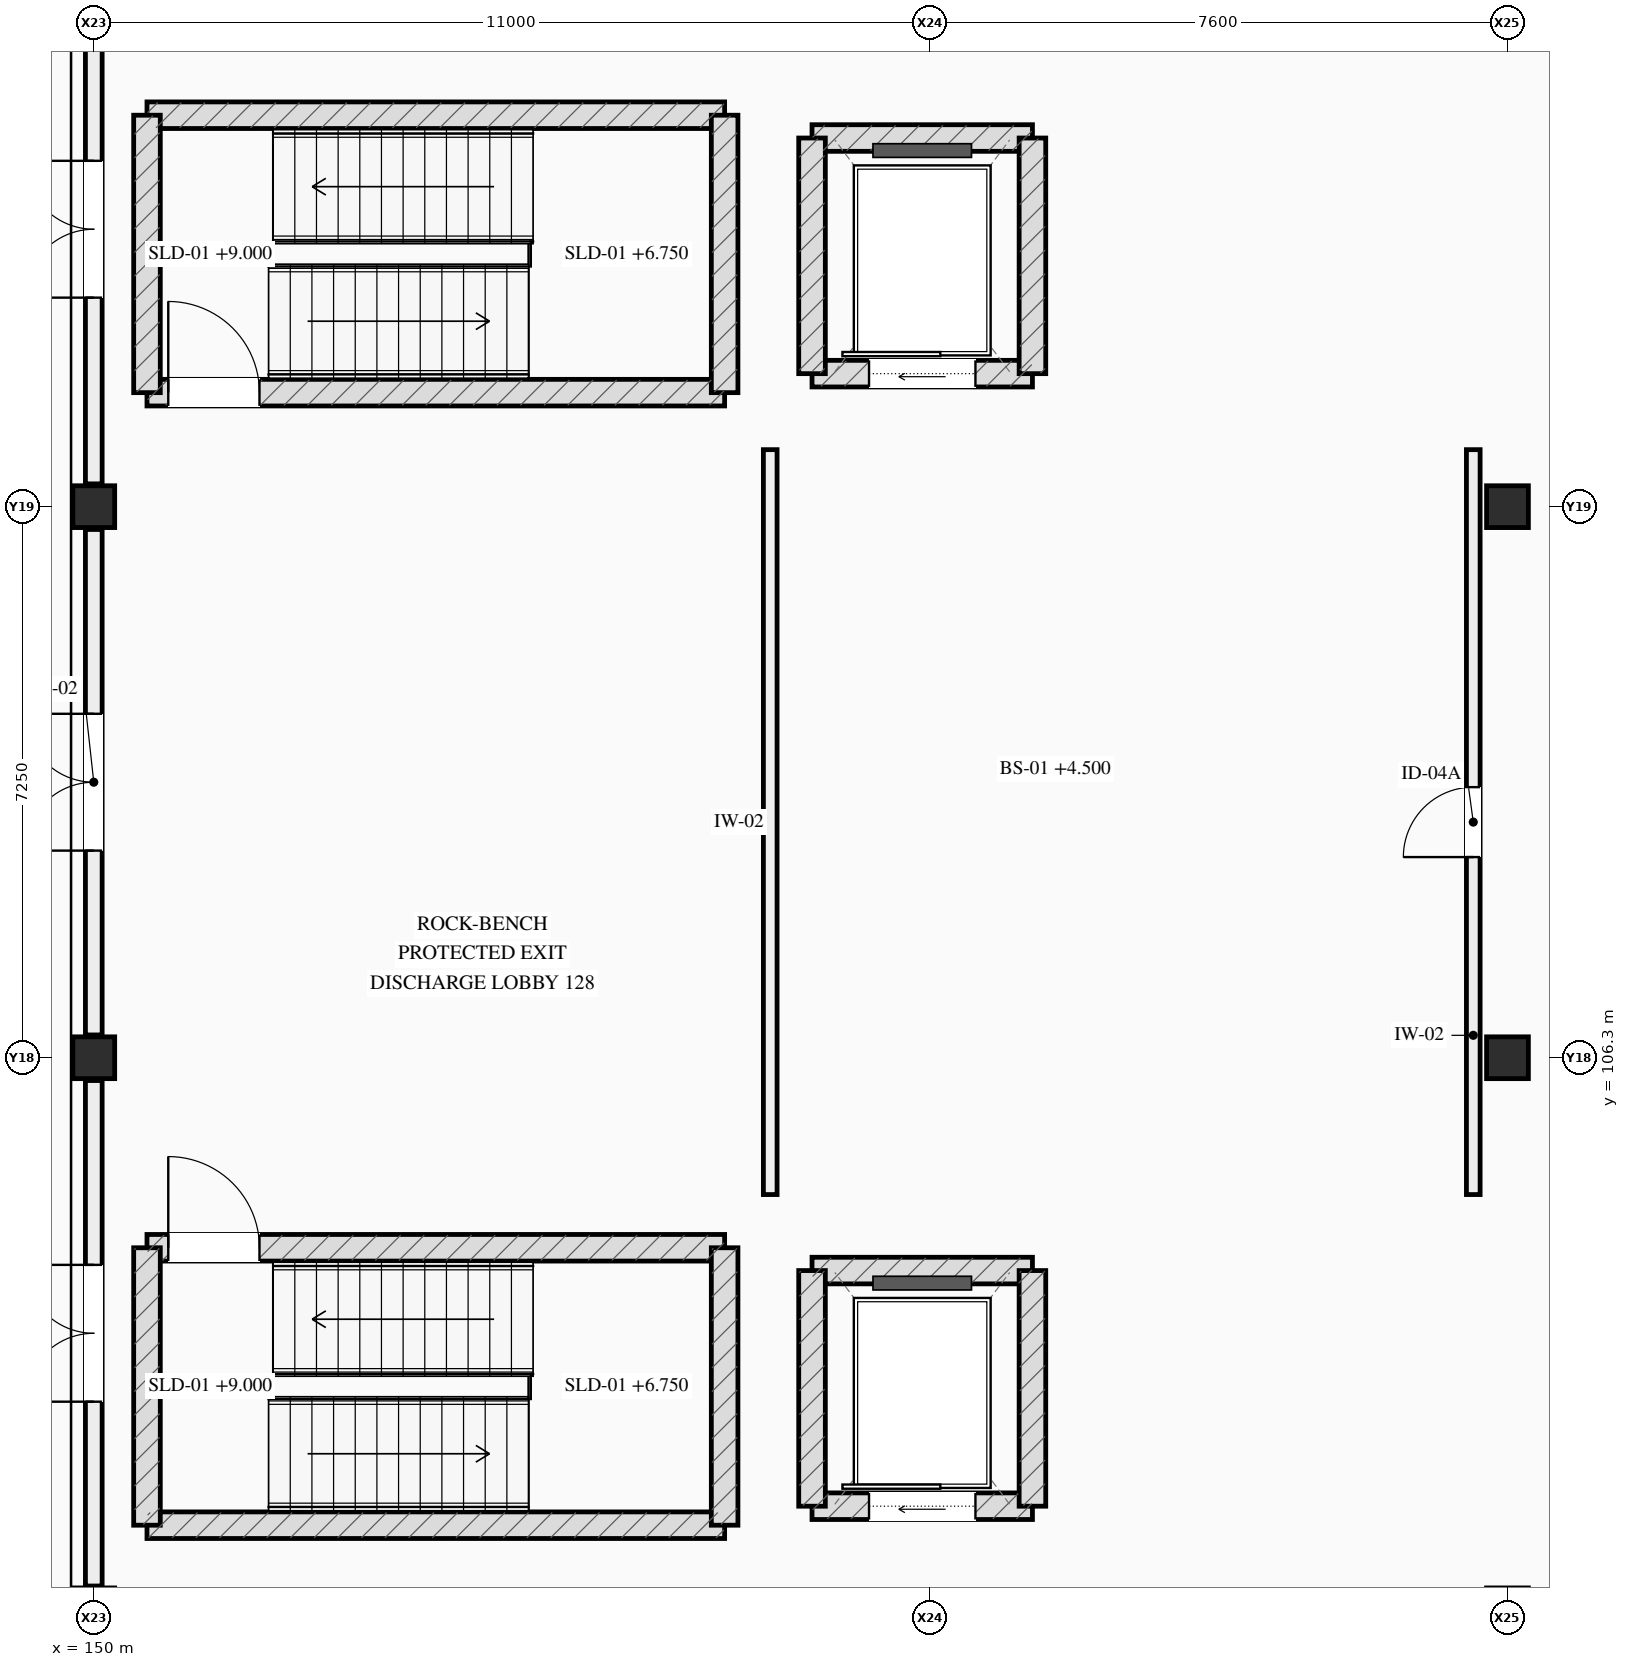
"""IFC4 building model, lengths in metres.
Left out: names, types, materials, properties, quantities, classifications, styles, units other than length and angle.
Written with IfcOpenShell. Run it as: python <this file> out.ifc"""

import sys

from ifc_helpers import new_model, si_unit, direction, frame, frame_2d, origin, origin_2d, place, context, subcontext, project, spatial, rectangle, extrude, element, fill, save


model = new_model("IFC4")
c1 = context("Model", 3, precision=1e-05, world=origin(), true_north=direction((0.0, 1.0)))
c2 = subcontext(c1, "Body", "Model", "MODEL_VIEW")
j1 = project(units=[si_unit("LENGTHUNIT", "METRE"), si_unit("PLANEANGLEUNIT", "RADIAN")], contexts=[c1])
p1 = place(None, origin())
s1 = spatial("IfcSite", under=j1, at=p1, CompositionType="ELEMENT")
p2 = place(p1, origin())
s2 = spatial("IfcBuilding", under=s1, at=p2, CompositionType="ELEMENT")
p3 = place(p2, frame((0.0, 0.0, 4.5)))
s3 = spatial("IfcBuildingStorey", under=s2, at=p3, CompositionType="ELEMENT", Elevation=4.5)
for number, where, z_axis, x_axis in (
    (1, (150.0, 99.05, 0.0), (0.0, 0.0, 1.0), (1.0, 0.0, 0.0)),
    (2, (150.0, 106.3, 0.0), (0.0, 0.0, 1.0), (1.0, 0.0, 0.0)),
    (3, (150.0, 113.55, 0.0), (0.0, 0.0, 1.0), (1.0, 0.0, 0.0)),
    (4, (168.6, 99.05, 0.0), (0.0, 0.0, 1.0), (1.0, 0.0, 0.0)),
    (5, (168.6, 106.3, 0.0), (0.0, 0.0, 1.0), (1.0, 0.0, 0.0)),
    (6, (168.6, 113.55, 0.0), (0.0, 0.0, 1.0), (1.0, 0.0, 0.0)),
):
    element("IfcColumn", number, at=place(p3, frame(where, z_axis=z_axis, x_axis=x_axis)), inside=s3, PredefinedType="COLUMN", context=c2, shape_type="SweptSolid", body=[
        extrude(rectangle(XDim=0.55, YDim=0.55, at=origin_2d()), origin(), (0.0, 0.0, 1.0), 4.5),
    ])
p4 = place(p3, frame((150.0, 99.35, 0.0), z_axis=(0.0, 0.0, 1.0), x_axis=(0.0, 1.0, 0.0)))
e7 = element("IfcWall", 7, at=p4, inside=s3, PredefinedType="STANDARD", context=c2, shape_type="SweptSolid", body=[
    extrude(rectangle(XDim=6.65, YDim=0.22, at=frame_2d((3.325, 0.0))), origin(), (0.0, 0.0, 1.0), 3.545),
])
p5 = place(p4, frame((2.425, 0.0, 0.0)))
e8 = element("IfcOpeningElement", 8, at=p5, cuts=e7, PredefinedType="OPENING", context=c2, shape_type="SweptSolid", body=[
    extrude(rectangle(XDim=1.8, YDim=2.25, at=frame_2d((0.9, 1.125))), frame((0.0, 0.12, 0.0), z_axis=(0.0, -1.0, 0.0), x_axis=(1.0, 0.0, 0.0)), (0.0, 0.0, 1.0), 0.24),
])
p6 = place(p3, frame((150.0, 106.6, 0.0), z_axis=(0.0, 0.0, 1.0), x_axis=(0.0, 1.0, 0.0)))
e9 = element("IfcWall", 9, at=p6, inside=s3, PredefinedType="STANDARD", context=c2, shape_type="SweptSolid", body=[
    extrude(rectangle(XDim=6.65, YDim=0.22, at=frame_2d((3.325, 0.0))), origin(), (0.0, 0.0, 1.0), 3.545),
])
p7 = place(p6, frame((2.425, 0.0, 0.0)))
e10 = element("IfcOpeningElement", 10, at=p7, cuts=e9, PredefinedType="OPENING", context=c2, shape_type="SweptSolid", body=[
    extrude(rectangle(XDim=1.8, YDim=2.25, at=frame_2d((0.9, 1.125))), frame((0.0, 0.12, 0.0), z_axis=(0.0, -1.0, 0.0), x_axis=(1.0, 0.0, 0.0)), (0.0, 0.0, 1.0), 0.24),
])
p8 = place(p3, frame((150.0, 113.85, 0.0), z_axis=(0.0, 0.0, 1.0), x_axis=(0.0, 1.0, 0.0)))
e11 = element("IfcWall", 11, at=p8, inside=s3, PredefinedType="STANDARD", context=c2, shape_type="SweptSolid", body=[
    extrude(rectangle(XDim=6.7, YDim=0.22, at=frame_2d((3.35, 0.0))), origin(), (0.0, 0.0, 1.0), 3.545),
])
p9 = place(p8, frame((2.45, 0.0, 0.0)))
e12 = element("IfcOpeningElement", 12, at=p9, cuts=e11, PredefinedType="OPENING", context=c2, shape_type="SweptSolid", body=[
    extrude(rectangle(XDim=1.8, YDim=2.25, at=frame_2d((0.9, 1.125))), frame((0.0, 0.12, 0.0), z_axis=(0.0, -1.0, 0.0), x_axis=(1.0, 0.0, 0.0)), (0.0, 0.0, 1.0), 0.24),
])
p10 = place(p3, frame((158.3, 100.15, 0.0), z_axis=(0.0, 0.0, 1.0), x_axis=(-1.0, 0.0, 0.0)))
e13 = element("IfcWall", 13, at=p10, inside=s3, PredefinedType="SHEAR", context=c2, shape_type="SweptSolid", body=[
    extrude(rectangle(XDim=7.6, YDim=0.35, at=frame_2d((3.8, 0.0))), origin(), (0.0, 0.0, 1.0), 4.215),
])
p11 = place(p3, frame((150.7, 103.8, 0.0), z_axis=(0.0, 0.0, 1.0), x_axis=(1.0, 0.0, 0.0)))
e14 = element("IfcWall", 14, at=p11, inside=s3, PredefinedType="SHEAR", context=c2, shape_type="SweptSolid", body=[
    extrude(rectangle(XDim=7.6, YDim=0.35, at=frame_2d((3.8, 0.0))), origin(), (0.0, 0.0, 1.0), 4.215),
])
p12 = place(p11, frame((0.28, 0.0, 0.0)))
e15 = element("IfcOpeningElement", 15, at=p12, cuts=e14, PredefinedType="OPENING", context=c2, shape_type="SweptSolid", body=[
    extrude(rectangle(XDim=1.2, YDim=2.2, at=frame_2d((0.6, 1.1))), frame((0.0, 0.185, 0.0), z_axis=(0.0, -1.0, 0.0), x_axis=(1.0, 0.0, 0.0)), (0.0, 0.0, 1.0), 0.37),
])
for number, where, z_axis, x_axis in (
    (16, (150.7, 100.15, 0.0), (0.0, 0.0, 1.0), (0.0, 1.0, 0.0)),
    (17, (158.3, 103.8, 0.0), (0.0, 0.0, 1.0), (0.0, -1.0, 0.0)),
):
    element("IfcWall", number, at=place(p3, frame(where, z_axis=z_axis, x_axis=x_axis)), inside=s3, PredefinedType="SHEAR", context=c2, shape_type="SweptSolid", body=[
        extrude(rectangle(XDim=3.65, YDim=0.35, at=frame_2d((1.825, 0.0))), origin(), (0.0, 0.0, 1.0), 4.215),
    ])
p13 = place(p3, frame((159.45, 100.4, 0.0), z_axis=(0.0, 0.0, 1.0), x_axis=(1.0, 0.0, 0.0)))
e18 = element("IfcWall", 18, at=p13, inside=s3, PredefinedType="SHEAR", context=c2, shape_type="SweptSolid", body=[
    extrude(rectangle(XDim=2.9, YDim=0.35, at=frame_2d((1.45, 0.0))), origin(), (0.0, 0.0, 1.0), 4.215),
])
p14 = place(p13, frame((0.75, 0.0, 0.0)))
e19 = element("IfcOpeningElement", 19, at=p14, cuts=e18, PredefinedType="OPENING", context=c2, shape_type="SweptSolid", body=[
    extrude(rectangle(XDim=1.4, YDim=2.2, at=frame_2d((0.7, 1.1))), frame((0.0, 0.185, 0.0), z_axis=(0.0, -1.0, 0.0), x_axis=(1.0, 0.0, 0.0)), (0.0, 0.0, 1.0), 0.37),
])
p15 = place(p3, frame((159.45, 103.5, 0.0), z_axis=(0.0, 0.0, 1.0), x_axis=(1.0, 0.0, 0.0)))
e20 = element("IfcWall", 20, at=p15, inside=s3, PredefinedType="SHEAR", context=c2, shape_type="SweptSolid", body=[
    extrude(rectangle(XDim=2.9, YDim=0.35, at=frame_2d((1.45, 0.0))), origin(), (0.0, 0.0, 1.0), 4.215),
])
for number, where, z_axis, x_axis in (
    (21, (159.45, 100.4, 0.0), (0.0, 0.0, 1.0), (0.0, 1.0, 0.0)),
    (22, (162.35, 100.4, 0.0), (0.0, 0.0, 1.0), (0.0, 1.0, 0.0)),
):
    element("IfcWall", number, at=place(p3, frame(where, z_axis=z_axis, x_axis=x_axis)), inside=s3, PredefinedType="SHEAR", context=c2, shape_type="SweptSolid", body=[
        extrude(rectangle(XDim=3.1, YDim=0.35, at=frame_2d((1.55, 0.0))), origin(), (0.0, 0.0, 1.0), 4.215),
    ])
p16 = place(p3, frame((158.3, 115.05, 0.0), z_axis=(0.0, 0.0, 1.0), x_axis=(-1.0, 0.0, 0.0)))
e23 = element("IfcWall", 23, at=p16, inside=s3, PredefinedType="SHEAR", context=c2, shape_type="SweptSolid", body=[
    extrude(rectangle(XDim=7.6, YDim=0.35, at=frame_2d((3.8, 0.0))), origin(), (0.0, 0.0, 1.0), 4.215),
])
p17 = place(p16, frame((6.12, 0.0, 0.0)))
e24 = element("IfcOpeningElement", 24, at=p17, cuts=e23, PredefinedType="OPENING", context=c2, shape_type="SweptSolid", body=[
    extrude(rectangle(XDim=1.2, YDim=2.2, at=frame_2d((0.6, 1.1))), frame((0.0, 0.185, 0.0), z_axis=(0.0, -1.0, 0.0), x_axis=(1.0, 0.0, 0.0)), (0.0, 0.0, 1.0), 0.37),
])
p18 = place(p3, frame((150.7, 118.7, 0.0), z_axis=(0.0, 0.0, 1.0), x_axis=(1.0, 0.0, 0.0)))
e25 = element("IfcWall", 25, at=p18, inside=s3, PredefinedType="SHEAR", context=c2, shape_type="SweptSolid", body=[
    extrude(rectangle(XDim=7.6, YDim=0.35, at=frame_2d((3.8, 0.0))), origin(), (0.0, 0.0, 1.0), 4.215),
])
for number, where, z_axis, x_axis in (
    (26, (150.7, 115.05, 0.0), (0.0, 0.0, 1.0), (0.0, 1.0, 0.0)),
    (27, (158.3, 118.7, 0.0), (0.0, 0.0, 1.0), (0.0, -1.0, 0.0)),
):
    element("IfcWall", number, at=place(p3, frame(where, z_axis=z_axis, x_axis=x_axis)), inside=s3, PredefinedType="SHEAR", context=c2, shape_type="SweptSolid", body=[
        extrude(rectangle(XDim=3.65, YDim=0.35, at=frame_2d((1.825, 0.0))), origin(), (0.0, 0.0, 1.0), 4.215),
    ])
p19 = place(p3, frame((159.45, 115.3, 0.0), z_axis=(0.0, 0.0, 1.0), x_axis=(1.0, 0.0, 0.0)))
e28 = element("IfcWall", 28, at=p19, inside=s3, PredefinedType="SHEAR", context=c2, shape_type="SweptSolid", body=[
    extrude(rectangle(XDim=2.9, YDim=0.35, at=frame_2d((1.45, 0.0))), origin(), (0.0, 0.0, 1.0), 4.215),
])
p20 = place(p19, frame((0.75, 0.0, 0.0)))
e29 = element("IfcOpeningElement", 29, at=p20, cuts=e28, PredefinedType="OPENING", context=c2, shape_type="SweptSolid", body=[
    extrude(rectangle(XDim=1.4, YDim=2.2, at=frame_2d((0.7, 1.1))), frame((0.0, 0.185, 0.0), z_axis=(0.0, -1.0, 0.0), x_axis=(1.0, 0.0, 0.0)), (0.0, 0.0, 1.0), 0.37),
])
p21 = place(p3, frame((159.45, 118.4, 0.0), z_axis=(0.0, 0.0, 1.0), x_axis=(1.0, 0.0, 0.0)))
e30 = element("IfcWall", 30, at=p21, inside=s3, PredefinedType="SHEAR", context=c2, shape_type="SweptSolid", body=[
    extrude(rectangle(XDim=2.9, YDim=0.35, at=frame_2d((1.45, 0.0))), origin(), (0.0, 0.0, 1.0), 4.215),
])
for number, where, z_axis, x_axis in (
    (31, (159.45, 115.3, 0.0), (0.0, 0.0, 1.0), (0.0, 1.0, 0.0)),
    (32, (162.35, 115.3, 0.0), (0.0, 0.0, 1.0), (0.0, 1.0, 0.0)),
):
    element("IfcWall", number, at=place(p3, frame(where, z_axis=z_axis, x_axis=x_axis)), inside=s3, PredefinedType="SHEAR", context=c2, shape_type="SweptSolid", body=[
        extrude(rectangle(XDim=3.1, YDim=0.35, at=frame_2d((1.55, 0.0))), origin(), (0.0, 0.0, 1.0), 4.215),
    ])
p22 = place(p3, frame((168.15, 104.5, 0.0), z_axis=(0.0, 0.0, 1.0), x_axis=(0.0, 1.0, 0.0)))
e33 = element("IfcWall", 33, at=p22, inside=s3, PredefinedType="PLUMBINGWALL", context=c2, shape_type="SweptSolid", body=[
    extrude(rectangle(XDim=9.8, YDim=0.18, at=frame_2d((4.9, 0.0))), origin(), (0.0, 0.0, 1.0), 3.3),
])
p23 = place(p22, frame((4.44, 0.0, 0.0)))
e34 = element("IfcOpeningElement", 34, at=p23, cuts=e33, PredefinedType="OPENING", context=c2, shape_type="SweptSolid", body=[
    extrude(rectangle(XDim=0.92, YDim=2.1, at=frame_2d((0.46, 1.05))), frame((0.0, 0.1, 0.0), z_axis=(0.0, -1.0, 0.0), x_axis=(1.0, 0.0, 0.0)), (0.0, 0.0, 1.0), 0.2),
])
p24 = place(p3, frame((158.9, 104.5, 0.0), z_axis=(0.0, 0.0, 1.0), x_axis=(0.0, 1.0, 0.0)))
e35 = element("IfcWall", 35, at=p24, inside=s3, PredefinedType="PLUMBINGWALL", context=c2, shape_type="SweptSolid", body=[
    extrude(rectangle(XDim=9.8, YDim=0.18, at=frame_2d((4.9, 0.0))), origin(), (0.0, 0.0, 1.0), 3.3),
])
p25 = place(p5, origin())
e36 = element("IfcDoor", 36, at=p25, inside=s3, OperationType="DOUBLE_DOOR_SINGLE_SWING", PredefinedType="DOOR", context=c2, shape_type="SweptSolid", body=[
    extrude(rectangle(XDim=1.8, YDim=2.25, at=frame_2d((0.9, 1.125))), frame((0.0, 0.025, 0.0), z_axis=(0.0, -1.0, 0.0), x_axis=(1.0, 0.0, 0.0)), (0.0, 0.0, 1.0), 0.05),
])
fill(e8, e36)
p26 = place(p7, origin())
e37 = element("IfcDoor", 37, at=p26, inside=s3, OperationType="DOUBLE_DOOR_SINGLE_SWING", PredefinedType="DOOR", context=c2, shape_type="SweptSolid", body=[
    extrude(rectangle(XDim=1.8, YDim=2.25, at=frame_2d((0.9, 1.125))), frame((0.0, 0.025, 0.0), z_axis=(0.0, -1.0, 0.0), x_axis=(1.0, 0.0, 0.0)), (0.0, 0.0, 1.0), 0.05),
])
fill(e10, e37)
p27 = place(p9, origin())
e38 = element("IfcDoor", 38, at=p27, inside=s3, OperationType="DOUBLE_DOOR_SINGLE_SWING", PredefinedType="DOOR", context=c2, shape_type="SweptSolid", body=[
    extrude(rectangle(XDim=1.8, YDim=2.25, at=frame_2d((0.9, 1.125))), frame((0.0, 0.025, 0.0), z_axis=(0.0, -1.0, 0.0), x_axis=(1.0, 0.0, 0.0)), (0.0, 0.0, 1.0), 0.05),
])
fill(e12, e38)
p28 = place(p12, origin())
e39 = element("IfcDoor", 39, at=p28, inside=s3, OperationType="SINGLE_SWING_LEFT", PredefinedType="DOOR", context=c2, shape_type="SweptSolid", body=[
    extrude(rectangle(XDim=1.2, YDim=2.2, at=frame_2d((0.6, 1.1))), frame((0.0, 0.025, 0.0), z_axis=(0.0, -1.0, 0.0), x_axis=(1.0, 0.0, 0.0)), (0.0, 0.0, 1.0), 0.05),
])
fill(e15, e39)
p29 = place(p14, origin())
e40 = element("IfcDoor", 40, at=p29, inside=s3, OperationType="SLIDING_TO_LEFT", PredefinedType="DOOR", context=c2, shape_type="SweptSolid", body=[
    extrude(rectangle(XDim=1.4, YDim=2.2, at=frame_2d((0.7, 1.1))), frame((0.0, 0.025, 0.0), z_axis=(0.0, -1.0, 0.0), x_axis=(1.0, 0.0, 0.0)), (0.0, 0.0, 1.0), 0.05),
])
fill(e19, e40)
p30 = place(p17, origin())
e41 = element("IfcDoor", 41, at=p30, inside=s3, OperationType="SINGLE_SWING_RIGHT", PredefinedType="DOOR", context=c2, shape_type="SweptSolid", body=[
    extrude(rectangle(XDim=1.2, YDim=2.2, at=frame_2d((0.6, 1.1))), frame((0.0, 0.025, 0.0), z_axis=(0.0, -1.0, 0.0), x_axis=(1.0, 0.0, 0.0)), (0.0, 0.0, 1.0), 0.05),
])
fill(e24, e41)
p31 = place(p20, origin())
e42 = element("IfcDoor", 42, at=p31, inside=s3, OperationType="SLIDING_TO_LEFT", PredefinedType="DOOR", context=c2, shape_type="SweptSolid", body=[
    extrude(rectangle(XDim=1.4, YDim=2.2, at=frame_2d((0.7, 1.1))), frame((0.0, 0.025, 0.0), z_axis=(0.0, -1.0, 0.0), x_axis=(1.0, 0.0, 0.0)), (0.0, 0.0, 1.0), 0.05),
])
fill(e29, e42)
p32 = place(p23, origin())
e43 = element("IfcDoor", 43, at=p32, inside=s3, OperationType="SINGLE_SWING_LEFT", PredefinedType="DOOR", context=c2, shape_type="SweptSolid", body=[
    extrude(rectangle(XDim=0.92, YDim=2.1, at=frame_2d((0.46, 1.05))), frame((0.0, 0.025, 0.0), z_axis=(0.0, -1.0, 0.0), x_axis=(1.0, 0.0, 0.0)), (0.0, 0.0, 1.0), 0.05),
])
fill(e34, e43)
save(model, sys.argv[1])
